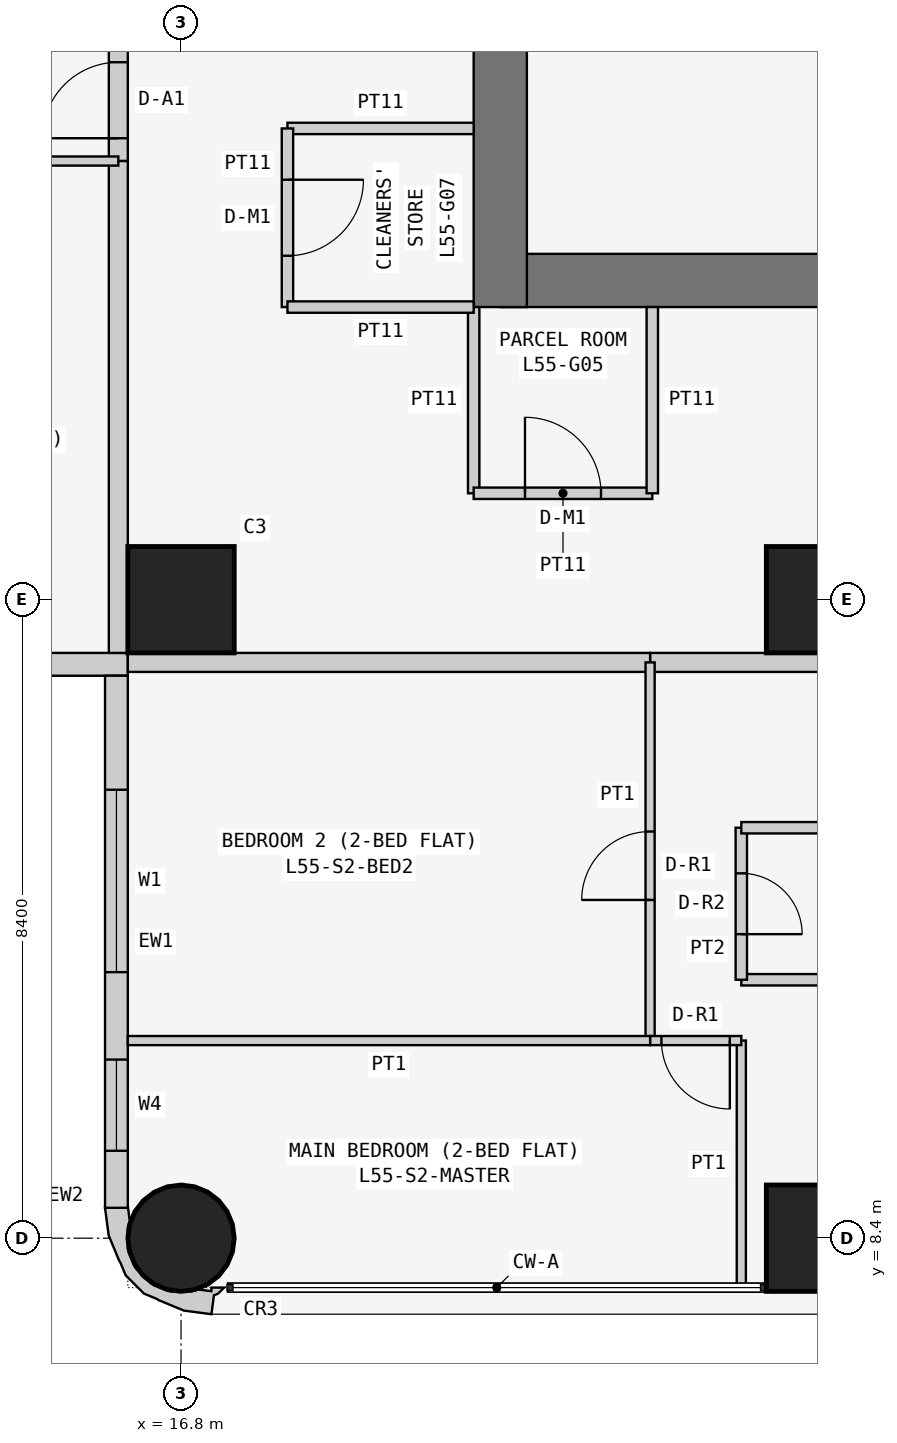
"""IFC4 building model, lengths in metres.
Left out: names, types, materials, properties, quantities, classifications, styles, units other than length and angle.
Written with IfcOpenShell. Run it as: python <this file> out.ifc"""

import sys

from ifc_helpers import new_model, si_unit, direction, frame, frame_2d, origin, origin_2d, place, context, subcontext, project, spatial, polyline, rectangle, circle, outline, extrude, element, fill, save


model = new_model("IFC4")
c1 = context("Model", 3, precision=1e-05, world=origin(), true_north=direction((0.0, 1.0)))
c2 = subcontext(c1, "Body", "Model", "MODEL_VIEW")
j1 = project(units=[si_unit("LENGTHUNIT", "METRE"), si_unit("PLANEANGLEUNIT", "RADIAN")], contexts=[c1])
p1 = place(None, origin())
s1 = spatial("IfcSite", under=j1, at=p1, CompositionType="ELEMENT")
p2 = place(p1, origin())
s2 = spatial("IfcBuilding", under=s1, at=p2, CompositionType="ELEMENT")
p3 = place(p2, frame((0.0, 0.0, 212.1)))
s3 = spatial("IfcBuildingStorey", under=s2, at=p3, CompositionType="ELEMENT", Elevation=212.1)
p4 = place(p3, frame((16.8, 8.4, 0.0), z_axis=(0.0, 0.0, 1.0), x_axis=(1.0, 0.0, 0.0)))
e1 = element("IfcColumn", 1, at=p4, inside=s3, PredefinedType="COLUMN", context=c2, shape_type="SweptSolid", body=[
    extrude(circle(Radius=0.7, at=origin_2d()), origin(), (0.0, 0.0, 1.0), 3.6),
])
for number, where, z_axis, x_axis in (
    (2, (16.8, 16.8, 0.0), (0.0, 0.0, 1.0), (1.0, 0.0, 0.0)),
    (3, (25.2, 8.4, 0.0), (0.0, 0.0, 1.0), (1.0, 0.0, 0.0)),
    (4, (25.2, 16.8, 0.0), (0.0, 0.0, 1.0), (1.0, 0.0, 0.0)),
):
    element("IfcColumn", number, at=place(p3, frame(where, z_axis=z_axis, x_axis=x_axis)), inside=s3, PredefinedType="COLUMN", context=c2, shape_type="SweptSolid", body=[
        extrude(rectangle(XDim=1.4, YDim=1.4, at=origin_2d()), origin(), (0.0, 0.0, 1.0), 3.6),
    ])
p5 = place(p3, frame((21.0, 21.0, 0.0), z_axis=(0.0, 0.0, 1.0), x_axis=(1.0, 0.0, 0.0)))
e5 = element("IfcWall", 5, at=p5, inside=s3, PredefinedType="SHEAR", context=c2, shape_type="SweptSolid", body=[
    extrude(rectangle(XDim=17.15, YDim=0.7, at=frame_2d((8.575, 0.0))), origin(), (0.0, 0.0, 1.0), 3.6),
])
p6 = place(p3, frame((21.0, 37.8, 0.0), z_axis=(0.0, 0.0, 1.0), x_axis=(0.0, -1.0, 0.0)))
e6 = element("IfcWall", 6, at=p6, inside=s3, PredefinedType="SHEAR", context=c2, shape_type="SweptSolid", body=[
    extrude(rectangle(XDim=17.15, YDim=0.7, at=frame_2d((8.575, 0.0))), origin(), (0.0, 0.0, 1.0), 3.6),
])
p7 = place(p6, frame((5.4, 0.0, 0.0)))
e7 = element("IfcOpeningElement", 7, at=p7, cuts=e6, PredefinedType="OPENING", context=c2, shape_type="SweptSolid", body=[
    extrude(rectangle(XDim=1.2, YDim=2.1, at=frame_2d((0.6, 1.05))), frame((0.0, 0.36, 0.0), z_axis=(0.0, -1.0, 0.0), x_axis=(1.0, 0.0, 0.0)), (0.0, 0.0, 1.0), 0.72),
])
p8 = place(p3, frame((0.4, 15.95, 0.0), z_axis=(0.0, 0.0, 1.0), x_axis=(1.0, 0.0, 0.0)))
e8 = element("IfcWall", 8, at=p8, inside=s3, PredefinedType="SOLIDWALL", context=c2, shape_type="SweptSolid", body=[
    extrude(rectangle(XDim=15.7, YDim=0.3, at=frame_2d((7.85, 0.0))), origin(), (0.0, 0.0, 1.0), 3.45),
])
p9 = place(p8, frame((12.4, 0.0, 0.9)))
e9 = element("IfcOpeningElement", 9, at=p9, cuts=e8, PredefinedType="OPENING", context=c2, shape_type="SweptSolid", body=[
    extrude(rectangle(XDim=1.8, YDim=1.5, at=frame_2d((0.9, 0.75))), frame((0.0, 0.16, 0.0), z_axis=(0.0, -1.0, 0.0), x_axis=(1.0, 0.0, 0.0)), (0.0, 0.0, 1.0), 0.32),
])
p10 = place(p8, frame((9.55, 0.0, 1.5)))
e10 = element("IfcOpeningElement", 10, at=p10, cuts=e8, PredefinedType="OPENING", context=c2, shape_type="SweptSolid", body=[
    extrude(rectangle(XDim=0.9, YDim=0.7, at=frame_2d((0.45, 0.35))), frame((0.0, 0.16, 0.0), z_axis=(0.0, -1.0, 0.0), x_axis=(1.0, 0.0, 0.0)), (0.0, 0.0, 1.0), 0.32),
])
p11 = place(p8, frame((5.1, 0.0, 0.9)))
e11 = element("IfcOpeningElement", 11, at=p11, cuts=e8, PredefinedType="OPENING", context=c2, shape_type="SweptSolid", body=[
    extrude(rectangle(XDim=1.8, YDim=1.5, at=frame_2d((0.9, 0.75))), frame((0.0, 0.16, 0.0), z_axis=(0.0, -1.0, 0.0), x_axis=(1.0, 0.0, 0.0)), (0.0, 0.0, 1.0), 0.32),
])
p12 = place(p8, frame((2.0, 0.0, 0.0)))
e12 = element("IfcOpeningElement", 12, at=p12, cuts=e8, PredefinedType="OPENING", context=c2, shape_type="SweptSolid", body=[
    extrude(rectangle(XDim=0.9, YDim=2.4, at=frame_2d((0.45, 1.2))), frame((0.0, 0.16, 0.0), z_axis=(0.0, -1.0, 0.0), x_axis=(1.0, 0.0, 0.0)), (0.0, 0.0, 1.0), 0.32),
])
p13 = place(p8, frame((0.7, 0.0, 0.9)))
e13 = element("IfcOpeningElement", 13, at=p13, cuts=e8, PredefinedType="OPENING", context=c2, shape_type="SweptSolid", body=[
    extrude(rectangle(XDim=1.2, YDim=1.5, at=frame_2d((0.6, 0.75))), frame((0.0, 0.16, 0.0), z_axis=(0.0, -1.0, 0.0), x_axis=(1.0, 0.0, 0.0)), (0.0, 0.0, 1.0), 0.32),
])
p14 = place(p3, frame((15.95, 15.8, 0.0), z_axis=(0.0, 0.0, 1.0), x_axis=(0.0, -1.0, 0.0)))
e14 = element("IfcWall", 14, at=p14, inside=s3, PredefinedType="SOLIDWALL", context=c2, shape_type="SweptSolid", body=[
    extrude(rectangle(XDim=7.0, YDim=0.3, at=frame_2d((3.5, 0.0))), origin(), (0.0, 0.0, 1.0), 3.45),
])
p15 = place(p14, frame((1.5, 0.0, 0.9)))
e15 = element("IfcOpeningElement", 15, at=p15, cuts=e14, PredefinedType="OPENING", context=c2, shape_type="SweptSolid", body=[
    extrude(rectangle(XDim=2.4, YDim=1.5, at=frame_2d((1.2, 0.75))), frame((0.0, 0.16, 0.0), z_axis=(0.0, -1.0, 0.0), x_axis=(1.0, 0.0, 0.0)), (0.0, 0.0, 1.0), 0.32),
])
p16 = place(p14, frame((5.05, 0.0, 0.9)))
e16 = element("IfcOpeningElement", 16, at=p16, cuts=e14, PredefinedType="OPENING", context=c2, shape_type="SweptSolid", body=[
    extrude(rectangle(XDim=1.2, YDim=1.5, at=frame_2d((0.6, 0.75))), frame((0.0, 0.16, 0.0), z_axis=(0.0, -1.0, 0.0), x_axis=(1.0, 0.0, 0.0)), (0.0, 0.0, 1.0), 0.32),
])
p17 = place(p3, frame((16.076, 8.69, 0.0), z_axis=(0.0, 0.0, 1.0), x_axis=(-0.439933741929, -0.898030234854, 0.0)))
e17 = element("IfcWall", 17, at=p17, inside=s3, PredefinedType="SOLIDWALL", context=c2, shape_type="SweptSolid", body=[
    extrude(outline(polyline([(0.664, 1.577), (0.426, 1.497), (0.382, 1.536), (0.276, 1.572), (0.349, 1.423), (0.392, 1.444), (0.453, 1.261), (0.51, 1.211), (0.632, 0.961), (0.65, 0.683), (0.56, 0.419), (0.375, 0.21), (0.125, 0.087), (0.05, 0.082), (-0.127, -0.035), (-0.145, -0.044), (0.022, -0.296), (0.327, -0.094), (0.568, 0.18), (0.578, 0.199), (0.7, 0.337), (0.811, 0.661), (0.799, 0.846), (0.803, 0.866), (0.78, 1.231), (0.664, 1.577)])), origin(), (0.0, 0.0, 1.0), 3.45),
])
p18 = place(p3, frame((20.65, 20.65, 0.0), z_axis=(0.0, 0.0, 1.0), x_axis=(0.0, -1.0, 0.0)))
e18 = element("IfcWall", 18, at=p18, inside=s3, PredefinedType="PARTITIONING", context=c2, shape_type="SweptSolid", body=[
    extrude(rectangle(XDim=2.45, YDim=0.15, at=frame_2d((1.225, 0.0))), origin(), (0.0, 0.0, 1.0), 3.45),
])
p19 = place(p3, frame((20.65, 18.2, 0.0), z_axis=(0.0, 0.0, 1.0), x_axis=(1.0, 0.0, 0.0)))
e19 = element("IfcWall", 19, at=p19, inside=s3, PredefinedType="PARTITIONING", context=c2, shape_type="SweptSolid", body=[
    extrude(rectangle(XDim=2.35, YDim=0.15, at=frame_2d((1.175, 0.0))), origin(), (0.0, 0.0, 1.0), 3.45),
])
p20 = place(p19, frame((0.675, 0.0, 0.0)))
e20 = element("IfcOpeningElement", 20, at=p20, cuts=e19, PredefinedType="OPENING", context=c2, shape_type="SweptSolid", body=[
    extrude(rectangle(XDim=1.0, YDim=2.1, at=frame_2d((0.5, 1.05))), frame((0.0, 0.085, 0.0), z_axis=(0.0, -1.0, 0.0), x_axis=(1.0, 0.0, 0.0)), (0.0, 0.0, 1.0), 0.17),
])
for number, where, z_axis, x_axis in (
    (21, (23.0, 18.2, 0.0), (0.0, 0.0, 1.0), (0.0, 1.0, 0.0)),
    (22, (20.65, 23.0, 0.0), (0.0, 0.0, 1.0), (-1.0, 0.0, 0.0)),
):
    element("IfcWall", number, at=place(p3, frame(where, z_axis=z_axis, x_axis=x_axis)), inside=s3, PredefinedType="PARTITIONING", context=c2, shape_type="SweptSolid", body=[
        extrude(rectangle(XDim=2.45, YDim=0.15, at=frame_2d((1.225, 0.0))), origin(), (0.0, 0.0, 1.0), 3.45),
    ])
p21 = place(p3, frame((18.2, 23.0, 0.0), z_axis=(0.0, 0.0, 1.0), x_axis=(0.0, -1.0, 0.0)))
e23 = element("IfcWall", 23, at=p21, inside=s3, PredefinedType="PARTITIONING", context=c2, shape_type="SweptSolid", body=[
    extrude(rectangle(XDim=2.35, YDim=0.15, at=frame_2d((1.175, 0.0))), origin(), (0.0, 0.0, 1.0), 3.45),
])
p22 = place(p21, frame((0.675, 0.0, 0.0)))
e24 = element("IfcOpeningElement", 24, at=p22, cuts=e23, PredefinedType="OPENING", context=c2, shape_type="SweptSolid", body=[
    extrude(rectangle(XDim=1.0, YDim=2.1, at=frame_2d((0.5, 1.05))), frame((0.0, 0.085, 0.0), z_axis=(0.0, -1.0, 0.0), x_axis=(1.0, 0.0, 0.0)), (0.0, 0.0, 1.0), 0.17),
])
p23 = place(p3, frame((18.2, 20.65, 0.0), z_axis=(0.0, 0.0, 1.0), x_axis=(1.0, 0.0, 0.0)))
e25 = element("IfcWall", 25, at=p23, inside=s3, PredefinedType="PARTITIONING", context=c2, shape_type="SweptSolid", body=[
    extrude(rectangle(XDim=2.45, YDim=0.15, at=frame_2d((1.225, 0.0))), origin(), (0.0, 0.0, 1.0), 3.45),
])
p24 = place(p3, frame((29.4, 15.975, 0.0), z_axis=(0.0, 0.0, 1.0), x_axis=(-1.0, 0.0, 0.0)))
e26 = element("IfcWall", 26, at=p24, inside=s3, PredefinedType="PARTITIONING", context=c2, shape_type="SweptSolid", body=[
    extrude(rectangle(XDim=6.429, YDim=0.25, at=frame_2d((3.214, 0.0))), origin(), (0.0, 0.0, 1.0), 3.45),
])
p25 = place(p24, frame((0.5, 0.0, 0.0)))
e27 = element("IfcOpeningElement", 27, at=p25, cuts=e26, PredefinedType="OPENING", context=c2, shape_type="SweptSolid", body=[
    extrude(rectangle(XDim=1.0, YDim=2.1, at=frame_2d((0.5, 1.05))), frame((0.0, 0.135, 0.0), z_axis=(0.0, -1.0, 0.0), x_axis=(1.0, 0.0, 0.0)), (0.0, 0.0, 1.0), 0.27),
])
p26 = place(p3, frame((22.971, 15.975, 0.0), z_axis=(0.0, 0.0, 1.0), x_axis=(-1.0, 0.0, 0.0)))
e28 = element("IfcWall", 28, at=p26, inside=s3, PredefinedType="PARTITIONING", context=c2, shape_type="SweptSolid", body=[
    extrude(rectangle(XDim=6.871, YDim=0.25, at=frame_2d((3.436, 0.0))), origin(), (0.0, 0.0, 1.0), 3.45),
])
p27 = place(p3, frame((15.975, 22.571, 0.0), z_axis=(0.0, 0.0, 1.0), x_axis=(0.0, 1.0, 0.0)))
e29 = element("IfcWall", 29, at=p27, inside=s3, PredefinedType="PARTITIONING", context=c2, shape_type="SweptSolid", body=[
    extrude(rectangle(XDim=1.6, YDim=0.25, at=frame_2d((0.8, 0.0))), origin(), (0.0, 0.0, 1.0), 3.45),
])
p28 = place(p27, frame((0.3, 0.0, 0.0)))
e30 = element("IfcOpeningElement", 30, at=p28, cuts=e29, PredefinedType="OPENING", context=c2, shape_type="SweptSolid", body=[
    extrude(rectangle(XDim=1.0, YDim=2.1, at=frame_2d((0.5, 1.05))), frame((0.0, 0.135, 0.0), z_axis=(0.0, -1.0, 0.0), x_axis=(1.0, 0.0, 0.0)), (0.0, 0.0, 1.0), 0.27),
])
p29 = place(p3, frame((15.975, 16.1, 0.0), z_axis=(0.0, 0.0, 1.0), x_axis=(0.0, 1.0, 0.0)))
e31 = element("IfcWall", 31, at=p29, inside=s3, PredefinedType="PARTITIONING", context=c2, shape_type="SweptSolid", body=[
    extrude(rectangle(XDim=6.471, YDim=0.25, at=frame_2d((3.235, 0.0))), origin(), (0.0, 0.0, 1.0), 3.45),
])
p30 = place(p3, frame((29.4, 11.8, 0.0), z_axis=(0.0, 0.0, 1.0), x_axis=(-1.0, 0.0, 0.0)))
e32 = element("IfcWall", 32, at=p30, inside=s3, PredefinedType="PARTITIONING", context=c2, shape_type="SweptSolid", body=[
    extrude(rectangle(XDim=5.229, YDim=0.15, at=frame_2d((2.615, 0.0))), origin(), (0.0, 0.0, 1.0), 3.45),
])
p31 = place(p3, frame((24.171, 11.8, 0.0), z_axis=(0.0, 0.0, 1.0), x_axis=(0.0, 1.0, 0.0)))
e33 = element("IfcWall", 33, at=p31, inside=s3, PredefinedType="PARTITIONING", context=c2, shape_type="SweptSolid", body=[
    extrude(rectangle(XDim=2.0, YDim=0.15, at=frame_2d((1.0, 0.0))), origin(), (0.0, 0.0, 1.0), 3.45),
])
p32 = place(p31, frame((0.6, 0.0, 0.0)))
e34 = element("IfcOpeningElement", 34, at=p32, cuts=e33, PredefinedType="OPENING", context=c2, shape_type="SweptSolid", body=[
    extrude(rectangle(XDim=0.8, YDim=2.1, at=frame_2d((0.4, 1.05))), frame((0.0, 0.085, 0.0), z_axis=(0.0, -1.0, 0.0), x_axis=(1.0, 0.0, 0.0)), (0.0, 0.0, 1.0), 0.17),
])
p33 = place(p3, frame((24.171, 13.8, 0.0), z_axis=(0.0, 0.0, 1.0), x_axis=(1.0, 0.0, 0.0)))
e35 = element("IfcWall", 35, at=p33, inside=s3, PredefinedType="PARTITIONING", context=c2, shape_type="SweptSolid", body=[
    extrude(rectangle(XDim=5.229, YDim=0.15, at=frame_2d((2.615, 0.0))), origin(), (0.0, 0.0, 1.0), 3.45),
])
p34 = place(p3, frame((22.971, 11.0, 0.0), z_axis=(0.0, 0.0, 1.0), x_axis=(0.0, 1.0, 0.0)))
e36 = element("IfcWall", 36, at=p34, inside=s3, PredefinedType="PARTITIONING", context=c2, shape_type="SweptSolid", body=[
    extrude(rectangle(XDim=4.975, YDim=0.12, at=frame_2d((2.488, 0.0))), origin(), (0.0, 0.0, 1.0), 3.45),
])
p35 = place(p34, frame((1.85, 0.0, 0.0)))
e37 = element("IfcOpeningElement", 37, at=p35, cuts=e36, PredefinedType="OPENING", context=c2, shape_type="SweptSolid", body=[
    extrude(rectangle(XDim=0.9, YDim=2.1, at=frame_2d((0.45, 1.05))), frame((0.0, 0.07, 0.0), z_axis=(0.0, -1.0, 0.0), x_axis=(1.0, 0.0, 0.0)), (0.0, 0.0, 1.0), 0.14),
])
p36 = place(p3, frame((24.171, 7.75, 0.0), z_axis=(0.0, 0.0, 1.0), x_axis=(0.0, 1.0, 0.0)))
e38 = element("IfcWall", 38, at=p36, inside=s3, PredefinedType="PARTITIONING", context=c2, shape_type="SweptSolid", body=[
    extrude(rectangle(XDim=3.25, YDim=0.12, at=frame_2d((1.625, 0.0))), origin(), (0.0, 0.0, 1.0), 3.45),
])
p37 = place(p3, frame((24.171, 11.0, 0.0), z_axis=(0.0, 0.0, 1.0), x_axis=(-1.0, 0.0, 0.0)))
e39 = element("IfcWall", 39, at=p37, inside=s3, PredefinedType="PARTITIONING", context=c2, shape_type="SweptSolid", body=[
    extrude(rectangle(XDim=1.2, YDim=0.12, at=frame_2d((0.6, 0.0))), origin(), (0.0, 0.0, 1.0), 3.45),
])
p38 = place(p37, frame((0.151, 0.0, 0.0)))
e40 = element("IfcOpeningElement", 40, at=p38, cuts=e39, PredefinedType="OPENING", context=c2, shape_type="SweptSolid", body=[
    extrude(rectangle(XDim=0.9, YDim=2.1, at=frame_2d((0.45, 1.05))), frame((0.0, 0.07, 0.0), z_axis=(0.0, -1.0, 0.0), x_axis=(1.0, 0.0, 0.0)), (0.0, 0.0, 1.0), 0.14),
])
p39 = place(p3, frame((22.971, 11.0, 0.0), z_axis=(0.0, 0.0, 1.0), x_axis=(-1.0, 0.0, 0.0)))
e41 = element("IfcWall", 41, at=p39, inside=s3, PredefinedType="PARTITIONING", context=c2, shape_type="SweptSolid", body=[
    extrude(rectangle(XDim=6.871, YDim=0.12, at=frame_2d((3.436, 0.0))), origin(), (0.0, 0.0, 1.0), 3.45),
])
p40 = place(p3, frame((11.2, 22.571, 0.0), z_axis=(0.0, 0.0, 1.0), x_axis=(1.0, 0.0, 0.0)))
e42 = element("IfcWall", 42, at=p40, inside=s3, PredefinedType="PARTITIONING", context=c2, shape_type="SweptSolid", body=[
    extrude(rectangle(XDim=4.775, YDim=0.12, at=frame_2d((2.388, 0.0))), origin(), (0.0, 0.0, 1.0), 3.45),
])
p41 = place(p40, frame((1.85, 0.0, 0.0)))
e43 = element("IfcOpeningElement", 43, at=p41, cuts=e42, PredefinedType="OPENING", context=c2, shape_type="SweptSolid", body=[
    extrude(rectangle(XDim=0.9, YDim=2.1, at=frame_2d((0.45, 1.05))), frame((0.0, 0.07, 0.0), z_axis=(0.0, -1.0, 0.0), x_axis=(1.0, 0.0, 0.0)), (0.0, 0.0, 1.0), 0.14),
])
p42 = place(p15, origin())
e44 = element("IfcWindow", 44, at=p42, inside=s3, PartitioningType="SINGLE_PANEL", PredefinedType="WINDOW", context=c2, shape_type="SweptSolid", body=[
    extrude(rectangle(XDim=2.4, YDim=1.5, at=frame_2d((1.2, 0.75))), frame((0.0, 0.03, 0.0), z_axis=(0.0, -1.0, 0.0), x_axis=(1.0, 0.0, 0.0)), (0.0, 0.0, 1.0), 0.06),
])
fill(e15, e44)
p43 = place(p16, origin())
e45 = element("IfcWindow", 45, at=p43, inside=s3, PartitioningType="SINGLE_PANEL", PredefinedType="WINDOW", context=c2, shape_type="SweptSolid", body=[
    extrude(rectangle(XDim=1.2, YDim=1.5, at=frame_2d((0.6, 0.75))), frame((0.0, 0.03, 0.0), z_axis=(0.0, -1.0, 0.0), x_axis=(1.0, 0.0, 0.0)), (0.0, 0.0, 1.0), 0.06),
])
fill(e16, e45)
p44 = place(p20, origin())
e46 = element("IfcDoor", 46, at=p44, inside=s3, OperationType="SINGLE_SWING_LEFT", PredefinedType="DOOR", context=c2, shape_type="SweptSolid", body=[
    extrude(rectangle(XDim=1.0, YDim=2.1, at=frame_2d((0.5, 1.05))), frame((0.0, 0.025, 0.0), z_axis=(0.0, -1.0, 0.0), x_axis=(1.0, 0.0, 0.0)), (0.0, 0.0, 1.0), 0.05),
])
fill(e20, e46)
p45 = place(p22, origin())
e47 = element("IfcDoor", 47, at=p45, inside=s3, OperationType="SINGLE_SWING_LEFT", PredefinedType="DOOR", context=c2, shape_type="SweptSolid", body=[
    extrude(rectangle(XDim=1.0, YDim=2.1, at=frame_2d((0.5, 1.05))), frame((0.0, 0.025, 0.0), z_axis=(0.0, -1.0, 0.0), x_axis=(1.0, 0.0, 0.0)), (0.0, 0.0, 1.0), 0.05),
])
fill(e24, e47)
p46 = place(p32, frame((0.8, 0.0, 0.0), z_axis=(0.0, 0.0, 1.0), x_axis=(-1.0, 0.0, 0.0)))
e48 = element("IfcDoor", 48, at=p46, inside=s3, OperationType="SINGLE_SWING_RIGHT", PredefinedType="DOOR", context=c2, shape_type="SweptSolid", body=[
    extrude(rectangle(XDim=0.8, YDim=2.1, at=frame_2d((0.4, 1.05))), frame((0.0, 0.025, 0.0), z_axis=(0.0, -1.0, 0.0), x_axis=(1.0, 0.0, 0.0)), (0.0, 0.0, 1.0), 0.05),
])
fill(e34, e48)
p47 = place(p35, origin())
e49 = element("IfcDoor", 49, at=p47, inside=s3, OperationType="SINGLE_SWING_LEFT", PredefinedType="DOOR", context=c2, shape_type="SweptSolid", body=[
    extrude(rectangle(XDim=0.9, YDim=2.1, at=frame_2d((0.45, 1.05))), frame((0.0, 0.025, 0.0), z_axis=(0.0, -1.0, 0.0), x_axis=(1.0, 0.0, 0.0)), (0.0, 0.0, 1.0), 0.05),
])
fill(e37, e49)
p48 = place(p38, origin())
e50 = element("IfcDoor", 50, at=p48, inside=s3, OperationType="SINGLE_SWING_LEFT", PredefinedType="DOOR", context=c2, shape_type="SweptSolid", body=[
    extrude(rectangle(XDim=0.9, YDim=2.1, at=frame_2d((0.45, 1.05))), frame((0.0, 0.025, 0.0), z_axis=(0.0, -1.0, 0.0), x_axis=(1.0, 0.0, 0.0)), (0.0, 0.0, 1.0), 0.05),
])
fill(e40, e50)
p49 = place(p28, origin())
e51 = element("IfcDoor", 51, at=p49, inside=s3, OperationType="SINGLE_SWING_LEFT", PredefinedType="DOOR", context=c2, shape_type="SweptSolid", body=[
    extrude(rectangle(XDim=1.0, YDim=2.1, at=frame_2d((0.5, 1.05))), frame((0.0, 0.025, 0.0), z_axis=(0.0, -1.0, 0.0), x_axis=(1.0, 0.0, 0.0)), (0.0, 0.0, 1.0), 0.05),
])
fill(e30, e51)
save(model, sys.argv[1])
